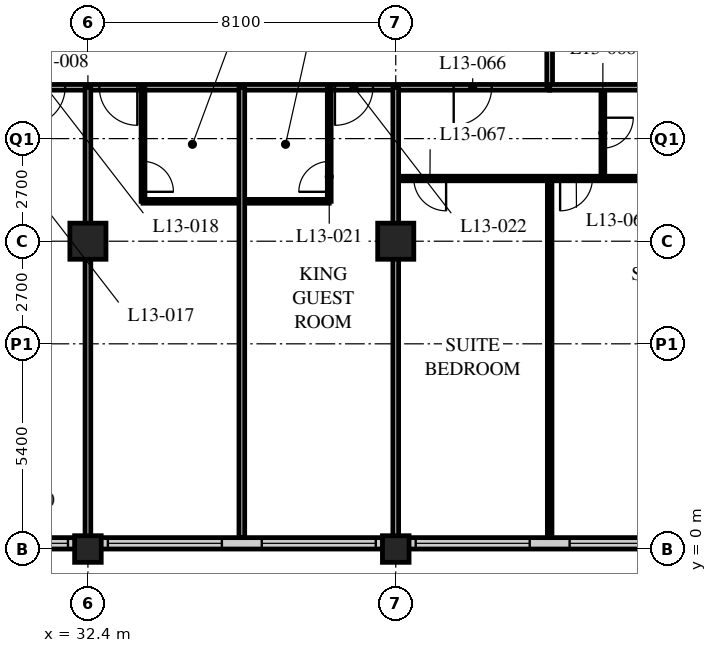
"""IFC4 building model, lengths in metres.
Left out: names, types, materials, properties, quantities, classifications, styles, units other than length and angle.
Written with IfcOpenShell. Run it as: python <this file> out.ifc"""

import sys

from ifc_helpers import new_model, si_unit, direction, frame, frame_2d, origin, origin_2d, place, context, subcontext, project, spatial, rectangle, hollow_rectangle, extrude, element, fill, save


model = new_model("IFC4")
c1 = context("Model", 3, precision=1e-05, world=origin(), true_north=direction((0.0, 1.0)))
c2 = subcontext(c1, "Body", "Model", "MODEL_VIEW")
j1 = project(units=[si_unit("LENGTHUNIT", "METRE"), si_unit("PLANEANGLEUNIT", "RADIAN")], contexts=[c1])
p1 = place(None, origin())
s1 = spatial("IfcSite", under=j1, at=p1, CompositionType="ELEMENT")
p2 = place(p1, origin())
s2 = spatial("IfcBuilding", under=s1, at=p2, CompositionType="ELEMENT")
p3 = place(p2, frame((0.0, 0.0, 56.8)))
s3 = spatial("IfcBuildingStorey", under=s2, at=p3, CompositionType="ELEMENT", Elevation=56.8)
p4 = place(p3, frame((32.4, 0.0, 0.0), z_axis=(0.0, 0.0, 1.0), x_axis=(1.0, 0.0, 0.0)))
e1 = element("IfcColumn", 1, at=p4, inside=s3, PredefinedType="COLUMN", context=c2, shape_type="SweptSolid", body=[
    extrude(hollow_rectangle(XDim=0.7, YDim=0.7, WallThickness=0.06, at=origin_2d()), origin(), (0.0, 0.0, 1.0), 3.4),
])
p5 = place(p3, frame((32.4, 8.1, 0.0), z_axis=(0.0, 0.0, 1.0), x_axis=(1.0, 0.0, 0.0)))
e2 = element("IfcColumn", 2, at=p5, inside=s3, PredefinedType="COLUMN", context=c2, shape_type="SweptSolid", body=[
    extrude(hollow_rectangle(XDim=0.95, YDim=0.95, WallThickness=0.095, at=origin_2d()), origin(), (0.0, 0.0, 1.0), 3.4),
])
p6 = place(p3, frame((40.5, 0.0, 0.0), z_axis=(0.0, 0.0, 1.0), x_axis=(1.0, 0.0, 0.0)))
e3 = element("IfcColumn", 3, at=p6, inside=s3, PredefinedType="COLUMN", context=c2, shape_type="SweptSolid", body=[
    extrude(hollow_rectangle(XDim=0.7, YDim=0.7, WallThickness=0.06, at=origin_2d()), origin(), (0.0, 0.0, 1.0), 3.4),
])
p7 = place(p3, frame((40.5, 8.1, 0.0), z_axis=(0.0, 0.0, 1.0), x_axis=(1.0, 0.0, 0.0)))
e4 = element("IfcColumn", 4, at=p7, inside=s3, PredefinedType="COLUMN", context=c2, shape_type="SweptSolid", body=[
    extrude(hollow_rectangle(XDim=0.95, YDim=0.95, WallThickness=0.095, at=origin_2d()), origin(), (0.0, 0.0, 1.0), 3.4),
])
p8 = place(p3, frame((8.4, 0.15, 0.0), z_axis=(0.0, 0.0, 1.0), x_axis=(1.0, 0.0, 0.0)))
e5 = element("IfcWall", 5, at=p8, inside=s3, PredefinedType="SOLIDWALL", context=c2, shape_type="SweptSolid", body=[
    extrude(rectangle(XDim=40.2, YDim=0.3, at=frame_2d((20.1, 0.0))), origin(), (0.0, 0.0, 1.0), 3.19),
])
p9 = place(p8, frame((0.225, 0.0, 0.9)))
e6 = element("IfcOpeningElement", 6, at=p9, cuts=e5, PredefinedType="OPENING", context=c2, shape_type="SweptSolid", body=[
    extrude(rectangle(XDim=3.0, YDim=2.0, at=frame_2d((1.5, 1.0))), frame((0.0, 0.16, 0.0), z_axis=(0.0, -1.0, 0.0), x_axis=(1.0, 0.0, 0.0)), (0.0, 0.0, 1.0), 0.32),
])
p10 = place(p8, frame((4.275, 0.0, 0.9)))
e7 = element("IfcOpeningElement", 7, at=p10, cuts=e5, PredefinedType="OPENING", context=c2, shape_type="SweptSolid", body=[
    extrude(rectangle(XDim=3.0, YDim=2.0, at=frame_2d((1.5, 1.0))), frame((0.0, 0.16, 0.0), z_axis=(0.0, -1.0, 0.0), x_axis=(1.0, 0.0, 0.0)), (0.0, 0.0, 1.0), 0.32),
])
p11 = place(p8, frame((8.325, 0.0, 0.9)))
e8 = element("IfcOpeningElement", 8, at=p11, cuts=e5, PredefinedType="OPENING", context=c2, shape_type="SweptSolid", body=[
    extrude(rectangle(XDim=3.0, YDim=2.0, at=frame_2d((1.5, 1.0))), frame((0.0, 0.16, 0.0), z_axis=(0.0, -1.0, 0.0), x_axis=(1.0, 0.0, 0.0)), (0.0, 0.0, 1.0), 0.32),
])
p12 = place(p8, frame((12.375, 0.0, 0.9)))
e9 = element("IfcOpeningElement", 9, at=p12, cuts=e5, PredefinedType="OPENING", context=c2, shape_type="SweptSolid", body=[
    extrude(rectangle(XDim=3.0, YDim=2.0, at=frame_2d((1.5, 1.0))), frame((0.0, 0.16, 0.0), z_axis=(0.0, -1.0, 0.0), x_axis=(1.0, 0.0, 0.0)), (0.0, 0.0, 1.0), 0.32),
])
p13 = place(p8, frame((16.425, 0.0, 0.9)))
e10 = element("IfcOpeningElement", 10, at=p13, cuts=e5, PredefinedType="OPENING", context=c2, shape_type="SweptSolid", body=[
    extrude(rectangle(XDim=3.0, YDim=2.0, at=frame_2d((1.5, 1.0))), frame((0.0, 0.16, 0.0), z_axis=(0.0, -1.0, 0.0), x_axis=(1.0, 0.0, 0.0)), (0.0, 0.0, 1.0), 0.32),
])
p14 = place(p8, frame((20.475, 0.0, 0.9)))
e11 = element("IfcOpeningElement", 11, at=p14, cuts=e5, PredefinedType="OPENING", context=c2, shape_type="SweptSolid", body=[
    extrude(rectangle(XDim=3.0, YDim=2.0, at=frame_2d((1.5, 1.0))), frame((0.0, 0.16, 0.0), z_axis=(0.0, -1.0, 0.0), x_axis=(1.0, 0.0, 0.0)), (0.0, 0.0, 1.0), 0.32),
])
p15 = place(p8, frame((24.525, 0.0, 0.9)))
e12 = element("IfcOpeningElement", 12, at=p15, cuts=e5, PredefinedType="OPENING", context=c2, shape_type="SweptSolid", body=[
    extrude(rectangle(XDim=3.0, YDim=2.0, at=frame_2d((1.5, 1.0))), frame((0.0, 0.16, 0.0), z_axis=(0.0, -1.0, 0.0), x_axis=(1.0, 0.0, 0.0)), (0.0, 0.0, 1.0), 0.32),
])
p16 = place(p8, frame((28.575, 0.0, 0.9)))
e13 = element("IfcOpeningElement", 13, at=p16, cuts=e5, PredefinedType="OPENING", context=c2, shape_type="SweptSolid", body=[
    extrude(rectangle(XDim=3.0, YDim=2.0, at=frame_2d((1.5, 1.0))), frame((0.0, 0.16, 0.0), z_axis=(0.0, -1.0, 0.0), x_axis=(1.0, 0.0, 0.0)), (0.0, 0.0, 1.0), 0.32),
])
p17 = place(p8, frame((32.625, 0.0, 0.9)))
e14 = element("IfcOpeningElement", 14, at=p17, cuts=e5, PredefinedType="OPENING", context=c2, shape_type="SweptSolid", body=[
    extrude(rectangle(XDim=3.0, YDim=2.0, at=frame_2d((1.5, 1.0))), frame((0.0, 0.16, 0.0), z_axis=(0.0, -1.0, 0.0), x_axis=(1.0, 0.0, 0.0)), (0.0, 0.0, 1.0), 0.32),
])
p18 = place(p8, frame((36.675, 0.0, 0.9)))
e15 = element("IfcOpeningElement", 15, at=p18, cuts=e5, PredefinedType="OPENING", context=c2, shape_type="SweptSolid", body=[
    extrude(rectangle(XDim=3.0, YDim=2.0, at=frame_2d((1.5, 1.0))), frame((0.0, 0.16, 0.0), z_axis=(0.0, -1.0, 0.0), x_axis=(1.0, 0.0, 0.0)), (0.0, 0.0, 1.0), 0.32),
])
p19 = place(p3, frame((12.15, 12.15, 0.0), z_axis=(0.0, 0.0, 1.0), x_axis=(1.0, 0.0, 0.0)))
e16 = element("IfcWall", 16, at=p19, inside=s3, PredefinedType="PARTITIONING", context=c2, shape_type="SweptSolid", body=[
    extrude(rectangle(XDim=32.4, YDim=0.15, at=frame_2d((16.2, 0.0))), origin(), (0.0, 0.0, 1.0), 3.19),
])
p20 = place(p19, frame((6.5, 0.0, 0.0)))
e17 = element("IfcOpeningElement", 17, at=p20, cuts=e16, PredefinedType="OPENING", context=c2, shape_type="SweptSolid", body=[
    extrude(rectangle(XDim=1.0, YDim=2.1, at=frame_2d((0.5, 1.05))), frame((0.0, 0.085, 0.0), z_axis=(0.0, -1.0, 0.0), x_axis=(1.0, 0.0, 0.0)), (0.0, 0.0, 1.0), 0.17),
])
p21 = place(p19, frame((8.4, 0.0, 0.0)))
e18 = element("IfcOpeningElement", 18, at=p21, cuts=e16, PredefinedType="OPENING", context=c2, shape_type="SweptSolid", body=[
    extrude(rectangle(XDim=1.0, YDim=2.1, at=frame_2d((0.5, 1.05))), frame((0.0, 0.085, 0.0), z_axis=(0.0, -1.0, 0.0), x_axis=(1.0, 0.0, 0.0)), (0.0, 0.0, 1.0), 0.17),
])
p22 = place(p19, frame((14.6, 0.0, 0.0)))
e19 = element("IfcOpeningElement", 19, at=p22, cuts=e16, PredefinedType="OPENING", context=c2, shape_type="SweptSolid", body=[
    extrude(rectangle(XDim=1.0, YDim=2.1, at=frame_2d((0.5, 1.05))), frame((0.0, 0.085, 0.0), z_axis=(0.0, -1.0, 0.0), x_axis=(1.0, 0.0, 0.0)), (0.0, 0.0, 1.0), 0.17),
])
p23 = place(p19, frame((18.65, 0.0, 0.0)))
e20 = element("IfcOpeningElement", 20, at=p23, cuts=e16, PredefinedType="OPENING", context=c2, shape_type="SweptSolid", body=[
    extrude(rectangle(XDim=1.0, YDim=2.1, at=frame_2d((0.5, 1.05))), frame((0.0, 0.085, 0.0), z_axis=(0.0, -1.0, 0.0), x_axis=(1.0, 0.0, 0.0)), (0.0, 0.0, 1.0), 0.17),
])
p24 = place(p19, frame((20.55, 0.0, 0.0)))
e21 = element("IfcOpeningElement", 21, at=p24, cuts=e16, PredefinedType="OPENING", context=c2, shape_type="SweptSolid", body=[
    extrude(rectangle(XDim=1.0, YDim=2.1, at=frame_2d((0.5, 1.05))), frame((0.0, 0.085, 0.0), z_axis=(0.0, -1.0, 0.0), x_axis=(1.0, 0.0, 0.0)), (0.0, 0.0, 1.0), 0.17),
])
p25 = place(p19, frame((26.75, 0.0, 0.0)))
e22 = element("IfcOpeningElement", 22, at=p25, cuts=e16, PredefinedType="OPENING", context=c2, shape_type="SweptSolid", body=[
    extrude(rectangle(XDim=1.0, YDim=2.1, at=frame_2d((0.5, 1.05))), frame((0.0, 0.085, 0.0), z_axis=(0.0, -1.0, 0.0), x_axis=(1.0, 0.0, 0.0)), (0.0, 0.0, 1.0), 0.17),
])
p26 = place(p19, frame((1.525, 0.0, 0.0)))
e23 = element("IfcOpeningElement", 23, at=p26, cuts=e16, PredefinedType="OPENING", context=c2, shape_type="SweptSolid", body=[
    extrude(rectangle(XDim=1.0, YDim=2.1, at=frame_2d((0.5, 1.05))), frame((0.0, 0.085, 0.0), z_axis=(0.0, -1.0, 0.0), x_axis=(1.0, 0.0, 0.0)), (0.0, 0.0, 1.0), 0.17),
])
p27 = place(p19, frame((29.875, 0.0, 0.0)))
e24 = element("IfcOpeningElement", 24, at=p27, cuts=e16, PredefinedType="OPENING", context=c2, shape_type="SweptSolid", body=[
    extrude(rectangle(XDim=1.0, YDim=2.1, at=frame_2d((0.5, 1.05))), frame((0.0, 0.085, 0.0), z_axis=(0.0, -1.0, 0.0), x_axis=(1.0, 0.0, 0.0)), (0.0, 0.0, 1.0), 0.17),
])
p28 = place(p3, frame((44.55, 12.15, 0.0), z_axis=(0.0, 0.0, 1.0), x_axis=(0.0, 1.0, 0.0)))
e25 = element("IfcWall", 25, at=p28, inside=s3, PredefinedType="PARTITIONING", context=c2, shape_type="SweptSolid", body=[
    extrude(rectangle(XDim=30.15, YDim=0.15, at=frame_2d((15.075, 0.0))), origin(), (0.0, 0.0, 1.0), 3.19),
])
p29 = place(p28, frame((2.75, 0.0, 0.0)))
e26 = element("IfcOpeningElement", 26, at=p29, cuts=e25, PredefinedType="OPENING", context=c2, shape_type="SweptSolid", body=[
    extrude(rectangle(XDim=1.0, YDim=2.1, at=frame_2d((0.5, 1.05))), frame((0.0, 0.085, 0.0), z_axis=(0.0, -1.0, 0.0), x_axis=(1.0, 0.0, 0.0)), (0.0, 0.0, 1.0), 0.17),
])
p30 = place(p28, frame((6.5, 0.0, 0.0)))
e27 = element("IfcOpeningElement", 27, at=p30, cuts=e25, PredefinedType="OPENING", context=c2, shape_type="SweptSolid", body=[
    extrude(rectangle(XDim=1.0, YDim=2.1, at=frame_2d((0.5, 1.05))), frame((0.0, 0.085, 0.0), z_axis=(0.0, -1.0, 0.0), x_axis=(1.0, 0.0, 0.0)), (0.0, 0.0, 1.0), 0.17),
])
p31 = place(p28, frame((10.55, 0.0, 0.0)))
e28 = element("IfcOpeningElement", 28, at=p31, cuts=e25, PredefinedType="OPENING", context=c2, shape_type="SweptSolid", body=[
    extrude(rectangle(XDim=1.0, YDim=2.1, at=frame_2d((0.5, 1.05))), frame((0.0, 0.085, 0.0), z_axis=(0.0, -1.0, 0.0), x_axis=(1.0, 0.0, 0.0)), (0.0, 0.0, 1.0), 0.17),
])
p32 = place(p28, frame((14.6, 0.0, 0.0)))
e29 = element("IfcOpeningElement", 29, at=p32, cuts=e25, PredefinedType="OPENING", context=c2, shape_type="SweptSolid", body=[
    extrude(rectangle(XDim=1.0, YDim=2.1, at=frame_2d((0.5, 1.05))), frame((0.0, 0.085, 0.0), z_axis=(0.0, -1.0, 0.0), x_axis=(1.0, 0.0, 0.0)), (0.0, 0.0, 1.0), 0.17),
])
p33 = place(p28, frame((18.65, 0.0, 0.0)))
e30 = element("IfcOpeningElement", 30, at=p33, cuts=e25, PredefinedType="OPENING", context=c2, shape_type="SweptSolid", body=[
    extrude(rectangle(XDim=1.0, YDim=2.1, at=frame_2d((0.5, 1.05))), frame((0.0, 0.085, 0.0), z_axis=(0.0, -1.0, 0.0), x_axis=(1.0, 0.0, 0.0)), (0.0, 0.0, 1.0), 0.17),
])
p34 = place(p28, frame((22.7, 0.0, 0.0)))
e31 = element("IfcOpeningElement", 31, at=p34, cuts=e25, PredefinedType="OPENING", context=c2, shape_type="SweptSolid", body=[
    extrude(rectangle(XDim=1.0, YDim=2.1, at=frame_2d((0.5, 1.05))), frame((0.0, 0.085, 0.0), z_axis=(0.0, -1.0, 0.0), x_axis=(1.0, 0.0, 0.0)), (0.0, 0.0, 1.0), 0.17),
])
p35 = place(p28, frame((26.7, 0.0, 0.0)))
e32 = element("IfcOpeningElement", 32, at=p35, cuts=e25, PredefinedType="OPENING", context=c2, shape_type="SweptSolid", body=[
    extrude(rectangle(XDim=1.0, YDim=2.1, at=frame_2d((0.5, 1.05))), frame((0.0, 0.085, 0.0), z_axis=(0.0, -1.0, 0.0), x_axis=(1.0, 0.0, 0.0)), (0.0, 0.0, 1.0), 0.17),
])
p36 = place(p3, frame((32.4, 12.15, 0.0), z_axis=(0.0, 0.0, 1.0), x_axis=(0.0, -1.0, 0.0)))
e33 = element("IfcWall", 33, at=p36, inside=s3, PredefinedType="PARTITIONING", context=c2, shape_type="SweptSolid", body=[
    extrude(rectangle(XDim=11.85, YDim=0.15, at=frame_2d((5.925, 0.0))), origin(), (0.0, 0.0, 1.0), 2.578),
])
p37 = place(p3, frame((33.85, 9.15, 0.0), z_axis=(0.0, 0.0, 1.0), x_axis=(1.0, 0.0, 0.0)))
e34 = element("IfcWall", 34, at=p37, inside=s3, PredefinedType="PARTITIONING", context=c2, shape_type="SweptSolid", body=[
    extrude(rectangle(XDim=4.9, YDim=0.1, at=frame_2d((2.45, 0.0))), origin(), (0.0, 0.0, 1.0), 3.19),
])
p38 = place(p3, frame((33.85, 12.15, 0.0), z_axis=(0.0, 0.0, 1.0), x_axis=(0.0, -1.0, 0.0)))
e35 = element("IfcWall", 35, at=p38, inside=s3, PredefinedType="PARTITIONING", context=c2, shape_type="SweptSolid", body=[
    extrude(rectangle(XDim=3.0, YDim=0.1, at=frame_2d((1.5, 0.0))), origin(), (0.0, 0.0, 1.0), 3.19),
])
p39 = place(p38, frame((1.95, 0.0, 0.0)))
e36 = element("IfcOpeningElement", 36, at=p39, cuts=e35, PredefinedType="OPENING", context=c2, shape_type="SweptSolid", body=[
    extrude(rectangle(XDim=0.8, YDim=2.1, at=frame_2d((0.4, 1.05))), frame((0.0, 0.06, 0.0), z_axis=(0.0, -1.0, 0.0), x_axis=(1.0, 0.0, 0.0)), (0.0, 0.0, 1.0), 0.12),
])
p40 = place(p3, frame((36.45, 12.15, 0.0), z_axis=(0.0, 0.0, 1.0), x_axis=(0.0, -1.0, 0.0)))
e37 = element("IfcWall", 37, at=p40, inside=s3, PredefinedType="PARTITIONING", context=c2, shape_type="SweptSolid", body=[
    extrude(rectangle(XDim=11.85, YDim=0.15, at=frame_2d((5.925, 0.0))), origin(), (0.0, 0.0, 1.0), 3.19),
])
p41 = place(p3, frame((38.75, 12.15, 0.0), z_axis=(0.0, 0.0, 1.0), x_axis=(0.0, -1.0, 0.0)))
e38 = element("IfcWall", 38, at=p41, inside=s3, PredefinedType="PARTITIONING", context=c2, shape_type="SweptSolid", body=[
    extrude(rectangle(XDim=3.0, YDim=0.1, at=frame_2d((1.5, 0.0))), origin(), (0.0, 0.0, 1.0), 3.19),
])
p42 = place(p41, frame((1.95, 0.0, 0.0)))
e39 = element("IfcOpeningElement", 39, at=p42, cuts=e38, PredefinedType="OPENING", context=c2, shape_type="SweptSolid", body=[
    extrude(rectangle(XDim=0.8, YDim=2.1, at=frame_2d((0.4, 1.05))), frame((0.0, 0.06, 0.0), z_axis=(0.0, -1.0, 0.0), x_axis=(1.0, 0.0, 0.0)), (0.0, 0.0, 1.0), 0.12),
])
p43 = place(p3, frame((40.5, 9.75, 0.0), z_axis=(0.0, 0.0, 1.0), x_axis=(1.0, 0.0, 0.0)))
e40 = element("IfcWall", 40, at=p43, inside=s3, PredefinedType="PARTITIONING", context=c2, shape_type="SweptSolid", body=[
    extrude(rectangle(XDim=8.05, YDim=0.12, at=frame_2d((4.025, 0.0))), origin(), (0.0, 0.0, 1.0), 3.19),
])
p44 = place(p43, frame((0.475, 0.0, 0.0)))
e41 = element("IfcOpeningElement", 41, at=p44, cuts=e40, PredefinedType="OPENING", context=c2, shape_type="SweptSolid", body=[
    extrude(rectangle(XDim=0.85, YDim=2.1, at=frame_2d((0.425, 1.05))), frame((0.0, 0.07, 0.0), z_axis=(0.0, -1.0, 0.0), x_axis=(1.0, 0.0, 0.0)), (0.0, 0.0, 1.0), 0.14),
])
p45 = place(p43, frame((4.325, 0.0, 0.0)))
e42 = element("IfcOpeningElement", 42, at=p45, cuts=e40, PredefinedType="OPENING", context=c2, shape_type="SweptSolid", body=[
    extrude(rectangle(XDim=0.85, YDim=2.1, at=frame_2d((0.425, 1.05))), frame((0.0, 0.07, 0.0), z_axis=(0.0, -1.0, 0.0), x_axis=(1.0, 0.0, 0.0)), (0.0, 0.0, 1.0), 0.14),
])
p46 = place(p3, frame((45.95, 12.15, 0.0), z_axis=(0.0, 0.0, 1.0), x_axis=(0.0, -1.0, 0.0)))
e43 = element("IfcWall", 43, at=p46, inside=s3, PredefinedType="PARTITIONING", context=c2, shape_type="SweptSolid", body=[
    extrude(rectangle(XDim=2.4, YDim=0.1, at=frame_2d((1.2, 0.0))), origin(), (0.0, 0.0, 1.0), 3.19),
])
p47 = place(p46, frame((0.8, 0.0, 0.0)))
e44 = element("IfcOpeningElement", 44, at=p47, cuts=e43, PredefinedType="OPENING", context=c2, shape_type="SweptSolid", body=[
    extrude(rectangle(XDim=0.8, YDim=2.1, at=frame_2d((0.4, 1.05))), frame((0.0, 0.06, 0.0), z_axis=(0.0, -1.0, 0.0), x_axis=(1.0, 0.0, 0.0)), (0.0, 0.0, 1.0), 0.12),
])
p48 = place(p3, frame((44.55, 9.75, 0.0), z_axis=(0.0, 0.0, 1.0), x_axis=(0.0, -1.0, 0.0)))
e45 = element("IfcWall", 45, at=p48, inside=s3, PredefinedType="PARTITIONING", context=c2, shape_type="SweptSolid", body=[
    extrude(rectangle(XDim=9.45, YDim=0.12, at=frame_2d((4.725, 0.0))), origin(), (0.0, 0.0, 1.0), 3.19),
])
p49 = place(p3, frame((44.55, 12.15, 0.0), z_axis=(0.0, 0.0, 1.0), x_axis=(1.0, 0.0, 0.0)))
e46 = element("IfcWall", 46, at=p49, inside=s3, PredefinedType="PARTITIONING", context=c2, shape_type="SweptSolid", body=[
    extrude(rectangle(XDim=11.85, YDim=0.15, at=frame_2d((5.925, 0.0))), origin(), (0.0, 0.0, 1.0), 3.19),
])
p50 = place(p3, frame((40.5, 12.15, 0.0), z_axis=(0.0, 0.0, 1.0), x_axis=(0.0, -1.0, 0.0)))
e47 = element("IfcWall", 47, at=p50, inside=s3, PredefinedType="PARTITIONING", context=c2, shape_type="SweptSolid", body=[
    extrude(rectangle(XDim=11.85, YDim=0.15, at=frame_2d((5.925, 0.0))), origin(), (0.0, 0.0, 1.0), 2.578),
])
p51 = place(p14, origin())
e48 = element("IfcWindow", 48, at=p51, inside=s3, PartitioningType="SINGLE_PANEL", PredefinedType="WINDOW", context=c2, shape_type="SweptSolid", body=[
    extrude(rectangle(XDim=3.0, YDim=2.0, at=frame_2d((1.5, 1.0))), frame((0.0, 0.03, 0.0), z_axis=(0.0, -1.0, 0.0), x_axis=(1.0, 0.0, 0.0)), (0.0, 0.0, 1.0), 0.06),
])
fill(e11, e48)
p52 = place(p15, origin())
e49 = element("IfcWindow", 49, at=p52, inside=s3, PartitioningType="SINGLE_PANEL", PredefinedType="WINDOW", context=c2, shape_type="SweptSolid", body=[
    extrude(rectangle(XDim=3.0, YDim=2.0, at=frame_2d((1.5, 1.0))), frame((0.0, 0.03, 0.0), z_axis=(0.0, -1.0, 0.0), x_axis=(1.0, 0.0, 0.0)), (0.0, 0.0, 1.0), 0.06),
])
fill(e12, e49)
p53 = place(p16, origin())
e50 = element("IfcWindow", 50, at=p53, inside=s3, PartitioningType="SINGLE_PANEL", PredefinedType="WINDOW", context=c2, shape_type="SweptSolid", body=[
    extrude(rectangle(XDim=3.0, YDim=2.0, at=frame_2d((1.5, 1.0))), frame((0.0, 0.03, 0.0), z_axis=(0.0, -1.0, 0.0), x_axis=(1.0, 0.0, 0.0)), (0.0, 0.0, 1.0), 0.06),
])
fill(e13, e50)
p54 = place(p17, origin())
e51 = element("IfcWindow", 51, at=p54, inside=s3, PartitioningType="SINGLE_PANEL", PredefinedType="WINDOW", context=c2, shape_type="SweptSolid", body=[
    extrude(rectangle(XDim=3.0, YDim=2.0, at=frame_2d((1.5, 1.0))), frame((0.0, 0.03, 0.0), z_axis=(0.0, -1.0, 0.0), x_axis=(1.0, 0.0, 0.0)), (0.0, 0.0, 1.0), 0.06),
])
fill(e14, e51)
p55 = place(p18, origin())
e52 = element("IfcWindow", 52, at=p55, inside=s3, PartitioningType="SINGLE_PANEL", PredefinedType="WINDOW", context=c2, shape_type="SweptSolid", body=[
    extrude(rectangle(XDim=3.0, YDim=2.0, at=frame_2d((1.5, 1.0))), frame((0.0, 0.03, 0.0), z_axis=(0.0, -1.0, 0.0), x_axis=(1.0, 0.0, 0.0)), (0.0, 0.0, 1.0), 0.06),
])
fill(e15, e52)
p56 = place(p23, origin())
e53 = element("IfcDoor", 53, at=p56, inside=s3, OperationType="SINGLE_SWING_RIGHT", PredefinedType="DOOR", context=c2, shape_type="SweptSolid", body=[
    extrude(rectangle(XDim=1.0, YDim=2.1, at=frame_2d((0.5, 1.05))), frame((0.0, 0.025, 0.0), z_axis=(0.0, -1.0, 0.0), x_axis=(1.0, 0.0, 0.0)), (0.0, 0.0, 1.0), 0.05),
])
fill(e20, e53)
p57 = place(p39, origin())
e54 = element("IfcDoor", 54, at=p57, inside=s3, OperationType="SINGLE_SWING_RIGHT", PredefinedType="DOOR", context=c2, shape_type="SweptSolid", body=[
    extrude(rectangle(XDim=0.8, YDim=2.1, at=frame_2d((0.4, 1.05))), frame((0.0, 0.025, 0.0), z_axis=(0.0, -1.0, 0.0), x_axis=(1.0, 0.0, 0.0)), (0.0, 0.0, 1.0), 0.05),
])
fill(e36, e54)
p58 = place(p24, origin())
e55 = element("IfcDoor", 55, at=p58, inside=s3, OperationType="SINGLE_SWING_LEFT", PredefinedType="DOOR", context=c2, shape_type="SweptSolid", body=[
    extrude(rectangle(XDim=1.0, YDim=2.1, at=frame_2d((0.5, 1.05))), frame((0.0, 0.025, 0.0), z_axis=(0.0, -1.0, 0.0), x_axis=(1.0, 0.0, 0.0)), (0.0, 0.0, 1.0), 0.05),
])
fill(e21, e55)
p59 = place(p42, origin())
e56 = element("IfcDoor", 56, at=p59, inside=s3, OperationType="SINGLE_SWING_LEFT", PredefinedType="DOOR", context=c2, shape_type="SweptSolid", body=[
    extrude(rectangle(XDim=0.8, YDim=2.1, at=frame_2d((0.4, 1.05))), frame((0.0, 0.025, 0.0), z_axis=(0.0, -1.0, 0.0), x_axis=(1.0, 0.0, 0.0)), (0.0, 0.0, 1.0), 0.05),
])
fill(e39, e56)
p60 = place(p25, origin())
e57 = element("IfcDoor", 57, at=p60, inside=s3, OperationType="SINGLE_SWING_RIGHT", PredefinedType="DOOR", context=c2, shape_type="SweptSolid", body=[
    extrude(rectangle(XDim=1.0, YDim=2.1, at=frame_2d((0.5, 1.05))), frame((0.0, 0.025, 0.0), z_axis=(0.0, -1.0, 0.0), x_axis=(1.0, 0.0, 0.0)), (0.0, 0.0, 1.0), 0.05),
])
fill(e22, e57)
p61 = place(p27, origin())
e58 = element("IfcDoor", 58, at=p61, inside=s3, OperationType="SINGLE_SWING_RIGHT", PredefinedType="DOOR", context=c2, shape_type="SweptSolid", body=[
    extrude(rectangle(XDim=1.0, YDim=2.1, at=frame_2d((0.5, 1.05))), frame((0.0, 0.025, 0.0), z_axis=(0.0, -1.0, 0.0), x_axis=(1.0, 0.0, 0.0)), (0.0, 0.0, 1.0), 0.05),
])
fill(e24, e58)
p62 = place(p44, origin())
e59 = element("IfcDoor", 59, at=p62, inside=s3, OperationType="SINGLE_SWING_LEFT", PredefinedType="DOOR", context=c2, shape_type="SweptSolid", body=[
    extrude(rectangle(XDim=0.85, YDim=2.1, at=frame_2d((0.425, 1.05))), frame((0.0, 0.025, 0.0), z_axis=(0.0, -1.0, 0.0), x_axis=(1.0, 0.0, 0.0)), (0.0, 0.0, 1.0), 0.05),
])
fill(e41, e59)
p63 = place(p47, origin())
e60 = element("IfcDoor", 60, at=p63, inside=s3, OperationType="SINGLE_SWING_LEFT", PredefinedType="DOOR", context=c2, shape_type="SweptSolid", body=[
    extrude(rectangle(XDim=0.8, YDim=2.1, at=frame_2d((0.4, 1.05))), frame((0.0, 0.025, 0.0), z_axis=(0.0, -1.0, 0.0), x_axis=(1.0, 0.0, 0.0)), (0.0, 0.0, 1.0), 0.05),
])
fill(e44, e60)
p64 = place(p45, origin())
e61 = element("IfcDoor", 61, at=p64, inside=s3, OperationType="SINGLE_SWING_RIGHT", PredefinedType="DOOR", context=c2, shape_type="SweptSolid", body=[
    extrude(rectangle(XDim=0.85, YDim=2.1, at=frame_2d((0.425, 1.05))), frame((0.0, 0.025, 0.0), z_axis=(0.0, -1.0, 0.0), x_axis=(1.0, 0.0, 0.0)), (0.0, 0.0, 1.0), 0.05),
])
fill(e42, e61)
save(model, sys.argv[1])
